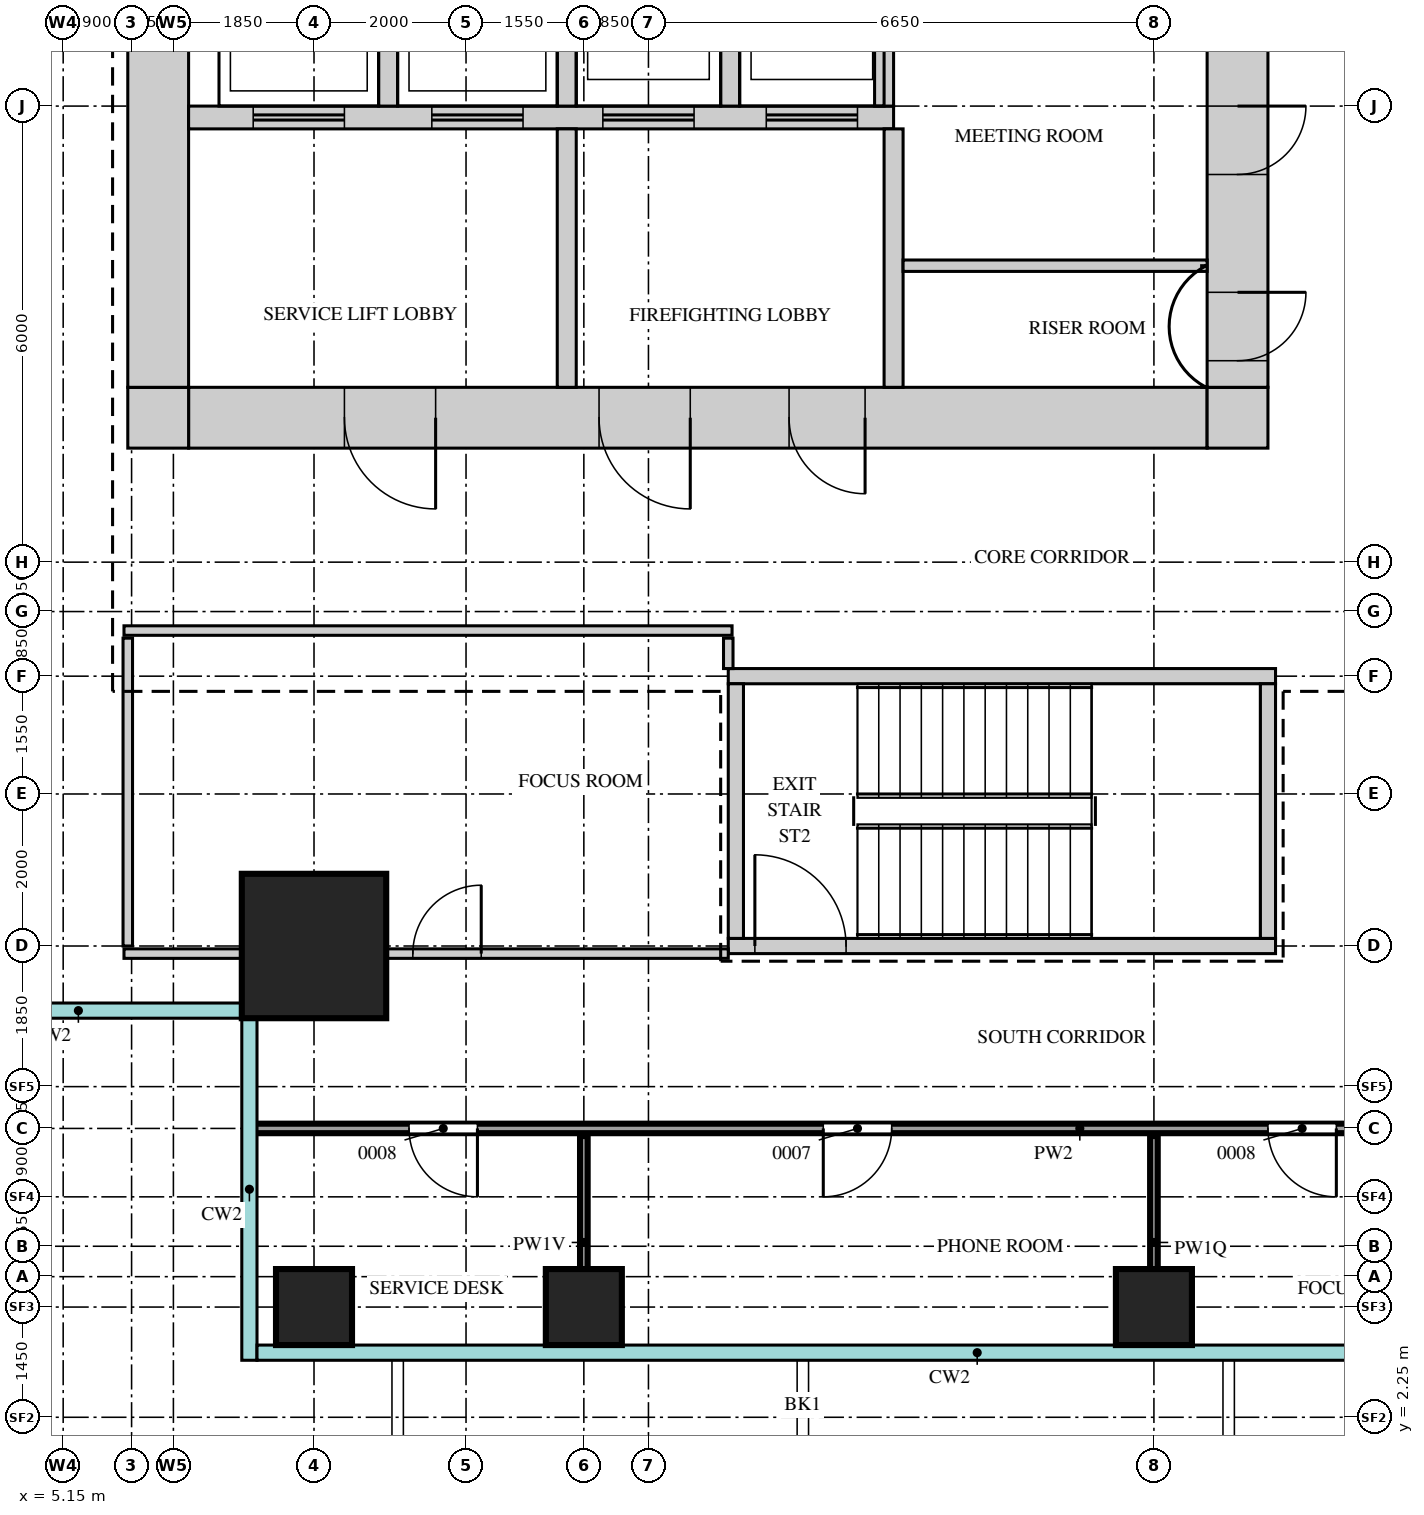
"""IFC4 building model, lengths in metres.
Left out: names, types, materials, properties, quantities, classifications, styles, units other than length and angle.
Written with IfcOpenShell. Run it as: python <this file> out.ifc"""

import sys

from ifc_helpers import new_model, si_unit, direction, frame, frame_2d, origin, origin_2d, place, context, subcontext, project, spatial, rectangle, extrude, source, transform, mapped, element, fill, save


model = new_model("IFC4")
c1 = context("Model", 3, precision=1e-05, world=origin(), true_north=direction((0.0, 1.0)))
c2 = subcontext(c1, "Body", "Model", "MODEL_VIEW")
j1 = project(units=[si_unit("LENGTHUNIT", "METRE"), si_unit("PLANEANGLEUNIT", "RADIAN")], contexts=[c1])
p1 = place(None, origin())
s1 = spatial("IfcSite", under=j1, at=p1, CompositionType="ELEMENT")
p2 = place(p1, origin())
s2 = spatial("IfcBuilding", under=s1, at=p2, CompositionType="ELEMENT")
p3 = place(p2, frame((0.0, 0.0, 172.7)))
s3 = spatial("IfcBuildingStorey", under=s2, at=p3, CompositionType="ELEMENT", Elevation=172.7)
m1 = source(origin(), c2, "Body", "SweptSolid", [
    extrude(rectangle(XDim=13.4, YDim=0.8, at=frame_2d((6.7, 0.0))), origin(), (0.0, 0.0, 1.0), 3.75),
])
p4 = place(p3, frame((6.8, 15.4, 0.0), z_axis=(0.0, 0.0, 1.0), x_axis=(1.0, 0.0, 0.0)))
e1 = element("IfcWall", 1, at=p4, inside=s3, PredefinedType="SHEAR", context=c2, shape_type="MappedRepresentation", body=[
    mapped(m1, transform((0.0, 0.0, 0.0))),
])
m2 = source(origin(), c2, "Body", "SweptSolid", [
    extrude(rectangle(XDim=1.2, YDim=2.1, at=frame_2d((0.6, 1.05))), frame((0.0, 0.41, 0.0), z_axis=(0.0, -1.0, 0.0), x_axis=(1.0, 0.0, 0.0)), (0.0, 0.0, 1.0), 0.82),
])
p5 = place(p4, frame((5.4, 0.0, 0.0)))
e2 = element("IfcOpeningElement", 2, at=p5, cuts=e1, PredefinedType="OPENING", context=c2, shape_type="MappedRepresentation", body=[
    mapped(m2, transform((0.0, 0.0, 0.0))),
])
p6 = place(p4, frame((2.05, 0.0, 0.0)))
e3 = element("IfcOpeningElement", 3, at=p6, cuts=e1, PredefinedType="OPENING", context=c2, shape_type="MappedRepresentation", body=[
    mapped(m2, transform((0.0, 0.0, 0.0))),
])
m3 = source(origin(), c2, "Body", "SweptSolid", [
    extrude(rectangle(XDim=1.0, YDim=2.1, at=frame_2d((0.5, 1.05))), frame((0.0, 0.41, 0.0), z_axis=(0.0, -1.0, 0.0), x_axis=(1.0, 0.0, 0.0)), (0.0, 0.0, 1.0), 0.82),
])
p7 = place(p4, frame((7.9, 0.0, 0.0)))
e4 = element("IfcOpeningElement", 4, at=p7, cuts=e1, PredefinedType="OPENING", context=c2, shape_type="MappedRepresentation", body=[
    mapped(m3, transform((0.0, 0.0, 0.0))),
])
m4 = source(origin(), c2, "Body", "SweptSolid", [
    extrude(rectangle(XDim=0.8, YDim=0.8, at=frame_2d((0.4, 0.0))), origin(), (0.0, 0.0, 1.0), 3.75),
])
for number, where, z_axis, x_axis in (
    (5, (20.2, 15.4, 0.0), (0.0, 0.0, 1.0), (1.0, 0.0, 0.0)),
    (6, (6.0, 15.4, 0.0), (0.0, 0.0, 1.0), (1.0, 0.0, 0.0)),
):
    element("IfcWall", number, at=place(p3, frame(where, z_axis=z_axis, x_axis=x_axis)), inside=s3, PredefinedType="SHEAR", context=c2, shape_type="MappedRepresentation", body=[
        mapped(m4, transform((0.0, 0.0, 0.0))),
    ])
m5 = source(origin(), c2, "Body", "SweptSolid", [
    extrude(rectangle(XDim=22.4, YDim=0.8, at=frame_2d((11.2, 0.0))), origin(), (0.0, 0.0, 1.0), 3.75),
])
p8 = place(p3, frame((20.6, 15.8, 0.0), z_axis=(0.0, 0.0, 1.0), x_axis=(0.0, 1.0, 0.0)))
e7 = element("IfcWall", 7, at=p8, inside=s3, PredefinedType="SHEAR", context=c2, shape_type="MappedRepresentation", body=[
    mapped(m5, transform((0.0, 0.0, 0.0))),
])
m6 = source(origin(), c2, "Body", "SweptSolid", [
    extrude(rectangle(XDim=1.8, YDim=2.1, at=frame_2d((0.9, 1.05))), frame((0.0, 0.41, 0.0), z_axis=(0.0, -1.0, 0.0), x_axis=(1.0, 0.0, 0.0)), (0.0, 0.0, 1.0), 0.82),
])
p9 = place(p8, frame((10.7, 0.0, 0.0)))
e8 = element("IfcOpeningElement", 8, at=p9, cuts=e7, PredefinedType="OPENING", context=c2, shape_type="MappedRepresentation", body=[
    mapped(m6, transform((0.0, 0.0, 0.0))),
])
m7 = source(origin(), c2, "Body", "SweptSolid", [
    extrude(rectangle(XDim=0.9, YDim=2.1, at=frame_2d((0.45, 1.05))), frame((0.0, 0.41, 0.0), z_axis=(0.0, -1.0, 0.0), x_axis=(1.0, 0.0, 0.0)), (0.0, 0.0, 1.0), 0.82),
])
p10 = place(p8, frame((0.35, 0.0, 0.0)))
e9 = element("IfcOpeningElement", 9, at=p10, cuts=e7, PredefinedType="OPENING", context=c2, shape_type="MappedRepresentation", body=[
    mapped(m7, transform((0.0, 0.0, 0.0))),
])
p11 = place(p8, frame((2.8, 0.0, 0.0)))
e10 = element("IfcOpeningElement", 10, at=p11, cuts=e7, PredefinedType="OPENING", context=c2, shape_type="MappedRepresentation", body=[
    mapped(m7, transform((0.0, 0.0, 0.0))),
])
p12 = place(p8, frame((5.55, 0.0, 0.0)))
e11 = element("IfcOpeningElement", 11, at=p12, cuts=e7, PredefinedType="OPENING", context=c2, shape_type="MappedRepresentation", body=[
    mapped(m7, transform((0.0, 0.0, 0.0))),
])
p13 = place(p3, frame((6.4, 15.8, 0.0), z_axis=(0.0, 0.0, 1.0), x_axis=(0.0, 1.0, 0.0)))
e12 = element("IfcWall", 12, at=p13, inside=s3, PredefinedType="SHEAR", context=c2, shape_type="MappedRepresentation", body=[
    mapped(m5, transform((0.0, 0.0, 0.0))),
])
m8 = source(origin(), c2, "Body", "SweptSolid", [
    extrude(rectangle(XDim=7.2, YDim=0.2, at=frame_2d((3.6, 0.0))), origin(), (0.0, 0.0, 1.0), 3.75),
])
p14 = place(p3, frame((13.9, 12.0, 0.0), z_axis=(0.0, 0.0, 1.0), x_axis=(1.0, 0.0, 0.0)))
e13 = element("IfcWall", 13, at=p14, inside=s3, PredefinedType="SHEAR", context=c2, shape_type="MappedRepresentation", body=[
    mapped(m8, transform((0.0, 0.0, 0.0))),
])
p15 = place(p3, frame((13.9, 8.45, 0.0), z_axis=(0.0, 0.0, 1.0), x_axis=(1.0, 0.0, 0.0)))
e14 = element("IfcWall", 14, at=p15, inside=s3, PredefinedType="SHEAR", context=c2, shape_type="MappedRepresentation", body=[
    mapped(m8, transform((0.0, 0.0, 0.0))),
])
m9 = source(origin(), c2, "Body", "SweptSolid", [
    extrude(rectangle(XDim=1.2, YDim=2.1, at=frame_2d((0.6, 1.05))), frame((0.0, 0.11, 0.0), z_axis=(0.0, -1.0, 0.0), x_axis=(1.0, 0.0, 0.0)), (0.0, 0.0, 1.0), 0.22),
])
p16 = place(p15, frame((0.35, 0.0, 0.0)))
e15 = element("IfcOpeningElement", 15, at=p16, cuts=e14, PredefinedType="OPENING", context=c2, shape_type="MappedRepresentation", body=[
    mapped(m9, transform((0.0, 0.0, 0.0))),
])
m10 = source(origin(), c2, "Body", "SweptSolid", [
    extrude(rectangle(XDim=3.35, YDim=0.2, at=frame_2d((1.675, 0.0))), origin(), (0.0, 0.0, 1.0), 3.75),
])
for number, where, z_axis, x_axis in (
    (16, (21.0, 8.55, 0.0), (0.0, 0.0, 1.0), (0.0, 1.0, 0.0)),
    (17, (14.0, 8.55, 0.0), (0.0, 0.0, 1.0), (0.0, 1.0, 0.0)),
):
    element("IfcWall", number, at=place(p3, frame(where, z_axis=z_axis, x_axis=x_axis)), inside=s3, PredefinedType="SHEAR", context=c2, shape_type="MappedRepresentation", body=[
        mapped(m10, transform((0.0, 0.0, 0.0))),
    ])
m11 = source(origin(), c2, "Body", "SweptSolid", [
    extrude(rectangle(XDim=9.275, YDim=0.3, at=frame_2d((4.637, 0.0))), origin(), (0.0, 0.0, 1.0), 3.75),
])
p17 = place(p3, frame((6.8, 19.35, 0.0), z_axis=(0.0, 0.0, 1.0), x_axis=(1.0, 0.0, 0.0)))
e18 = element("IfcWall", 18, at=p17, inside=s3, PredefinedType="STANDARD", context=c2, shape_type="MappedRepresentation", body=[
    mapped(m11, transform((0.0, 0.0, 0.0))),
])
m12 = source(origin(), c2, "Body", "SweptSolid", [
    extrude(rectangle(XDim=1.2, YDim=2.1, at=frame_2d((0.6, 1.05))), frame((0.0, 0.16, 0.0), z_axis=(0.0, -1.0, 0.0), x_axis=(1.0, 0.0, 0.0)), (0.0, 0.0, 1.0), 0.32),
])
p18 = place(p17, frame((0.85, 0.0, 0.0)))
e19 = element("IfcOpeningElement", 19, at=p18, cuts=e18, PredefinedType="OPENING", context=c2, shape_type="MappedRepresentation", body=[
    mapped(m12, transform((0.0, 0.0, 0.0))),
])
p19 = place(p17, frame((3.2, 0.0, 0.0)))
e20 = element("IfcOpeningElement", 20, at=p19, cuts=e18, PredefinedType="OPENING", context=c2, shape_type="MappedRepresentation", body=[
    mapped(m12, transform((0.0, 0.0, 0.0))),
])
p20 = place(p17, frame((5.45, 0.0, 0.0)))
e21 = element("IfcOpeningElement", 21, at=p20, cuts=e18, PredefinedType="OPENING", context=c2, shape_type="MappedRepresentation", body=[
    mapped(m12, transform((0.0, 0.0, 0.0))),
])
p21 = place(p17, frame((7.6, 0.0, 0.0)))
e22 = element("IfcOpeningElement", 22, at=p21, cuts=e18, PredefinedType="OPENING", context=c2, shape_type="MappedRepresentation", body=[
    mapped(m12, transform((0.0, 0.0, 0.0))),
])
m13 = source(origin(), c2, "Body", "SweptSolid", [
    extrude(rectangle(XDim=3.1, YDim=0.25, at=frame_2d((1.55, 0.0))), origin(), (0.0, 0.0, 1.0), 3.75),
])
for number, where, z_axis, x_axis in (
    (23, (9.425, 19.5, 0.0), (0.0, 0.0, 1.0), (0.0, 1.0, 0.0)),
    (24, (11.775, 19.5, 0.0), (0.0, 0.0, 1.0), (0.0, 1.0, 0.0)),
    (25, (13.925, 19.5, 0.0), (0.0, 0.0, 1.0), (0.0, 1.0, 0.0)),
    (26, (15.95, 19.5, 0.0), (0.0, 0.0, 1.0), (0.0, 1.0, 0.0)),
):
    element("IfcWall", number, at=place(p3, frame(where, z_axis=z_axis, x_axis=x_axis)), inside=s3, PredefinedType="STANDARD", context=c2, shape_type="MappedRepresentation", body=[
        mapped(m13, transform((0.0, 0.0, 0.0))),
    ])
m14 = source(origin(), c2, "Body", "SweptSolid", [
    extrude(rectangle(XDim=3.4, YDim=0.25, at=frame_2d((1.7, 0.0))), origin(), (0.0, 0.0, 1.0), 3.75),
])
for number, where, z_axis, x_axis in (
    (27, (16.075, 15.8, 0.0), (0.0, 0.0, 1.0), (0.0, 1.0, 0.0)),
    (28, (11.775, 15.8, 0.0), (0.0, 0.0, 1.0), (0.0, 1.0, 0.0)),
):
    element("IfcWall", number, at=place(p3, frame(where, z_axis=z_axis, x_axis=x_axis)), inside=s3, PredefinedType="STANDARD", context=c2, shape_type="MappedRepresentation", body=[
        mapped(m14, transform((0.0, 0.0, 0.0))),
    ])
m15 = source(origin(), c2, "Body", "SweptSolid", [
    extrude(rectangle(XDim=1.9, YDim=1.9, at=origin_2d()), origin(), (0.0, 0.0, 1.0), 4.0),
])
p22 = place(p3, frame((8.45, 8.45, 0.0), z_axis=(0.0, 0.0, 1.0), x_axis=(1.0, 0.0, 0.0)))
e29 = element("IfcColumn", 29, at=p22, inside=s3, PredefinedType="COLUMN", context=c2, shape_type="MappedRepresentation", body=[
    mapped(m15, transform((0.0, 0.0, 0.0))),
])
m16 = source(origin(), c2, "Body", "SweptSolid", [
    extrude(rectangle(XDim=1.0, YDim=1.0, at=origin_2d()), origin(), (0.0, 0.0, 1.0), 3.75),
])
for number, where, z_axis, x_axis in (
    (30, (8.45, 3.7, 0.0), (0.0, 0.0, 1.0), (1.0, 0.0, 0.0)),
    (31, (12.0, 3.7, 0.0), (0.0, 0.0, 1.0), (1.0, 0.0, 0.0)),
    (32, (19.5, 3.7, 0.0), (0.0, 0.0, 1.0), (1.0, 0.0, 0.0)),
):
    element("IfcColumn", number, at=place(p3, frame(where, z_axis=z_axis, x_axis=x_axis)), inside=s3, PredefinedType="COLUMN", context=c2, shape_type="MappedRepresentation", body=[
        mapped(m16, transform((0.0, 0.0, 0.0))),
    ])
m17 = source(origin(), c2, "Body", "SweptSolid", [
    extrude(rectangle(XDim=2.8, YDim=0.1, at=frame_2d((1.4, 0.0))), origin(), (0.0, 0.0, 1.0), 3.25),
])
p23 = place(p3, frame((12.0, 3.15, 0.0), z_axis=(0.0, 0.0, 1.0), x_axis=(0.0, 1.0, 0.0)))
e33 = element("IfcWall", 33, at=p23, inside=s3, PredefinedType="PARTITIONING", context=c2, shape_type="MappedRepresentation", body=[
    mapped(m17, transform((0.0, 0.0, 0.0))),
])
m18 = source(origin(), c2, "Body", "SweptSolid", [
    extrude(rectangle(XDim=2.8, YDim=0.1, at=frame_2d((1.4, 0.0))), origin(), (0.0, 0.0, 1.0), 3.42),
])
p24 = place(p3, frame((19.5, 3.15, 0.0), z_axis=(0.0, 0.0, 1.0), x_axis=(0.0, 1.0, 0.0)))
e34 = element("IfcWall", 34, at=p24, inside=s3, PredefinedType="PARTITIONING", context=c2, shape_type="MappedRepresentation", body=[
    mapped(m18, transform((0.0, 0.0, 0.0))),
])
m19 = source(origin(), c2, "Body", "SweptSolid", [
    extrude(rectangle(XDim=15.8, YDim=0.125, at=frame_2d((7.9, 0.0))), origin(), (0.0, 0.0, 1.0), 3.8),
])
p25 = place(p3, frame((7.65, 6.05, 0.0), z_axis=(0.0, 0.0, 1.0), x_axis=(1.0, 0.0, 0.0)))
e35 = element("IfcWall", 35, at=p25, inside=s3, PredefinedType="PARTITIONING", context=c2, shape_type="MappedRepresentation", body=[
    mapped(m19, transform((0.0, 0.0, 0.0))),
])
m20 = source(origin(), c2, "Body", "SweptSolid", [
    extrude(rectangle(XDim=0.9, YDim=2.1, at=frame_2d((0.45, 1.05))), frame((0.0, 0.073, 0.0), z_axis=(0.0, -1.0, 0.0), x_axis=(1.0, 0.0, 0.0)), (0.0, 0.0, 1.0), 0.145),
])
p26 = place(p25, frame((2.05, 0.0, 0.0)))
e36 = element("IfcOpeningElement", 36, at=p26, cuts=e35, PredefinedType="OPENING", context=c2, shape_type="MappedRepresentation", body=[
    mapped(m20, transform((0.0, 0.0, 0.0))),
])
p27 = place(p25, frame((7.5, 0.0, 0.0)))
e37 = element("IfcOpeningElement", 37, at=p27, cuts=e35, PredefinedType="OPENING", context=c2, shape_type="MappedRepresentation", body=[
    mapped(m20, transform((0.0, 0.0, 0.0))),
])
p28 = place(p25, frame((13.35, 0.0, 0.0)))
e38 = element("IfcOpeningElement", 38, at=p28, cuts=e35, PredefinedType="OPENING", context=c2, shape_type="MappedRepresentation", body=[
    mapped(m20, transform((0.0, 0.0, 0.0))),
])
m21 = source(origin(), c2, "Body", "SweptSolid", [
    extrude(rectangle(XDim=7.95, YDim=0.125, at=frame_2d((3.975, 0.0))), origin(), (0.0, 0.0, 1.0), 3.25),
])
p29 = place(p3, frame((5.95, 8.35, 0.0), z_axis=(0.0, 0.0, 1.0), x_axis=(1.0, 0.0, 0.0)))
e39 = element("IfcWall", 39, at=p29, inside=s3, PredefinedType="PARTITIONING", context=c2, shape_type="MappedRepresentation", body=[
    mapped(m21, transform((0.0, 0.0, 0.0))),
])
p30 = place(p29, frame((3.8, 0.0, 0.0)))
e40 = element("IfcOpeningElement", 40, at=p30, cuts=e39, PredefinedType="OPENING", context=c2, shape_type="MappedRepresentation", body=[
    mapped(m20, transform((0.0, 0.0, 0.0))),
])
m22 = source(origin(), c2, "Body", "SweptSolid", [
    extrude(rectangle(XDim=4.05, YDim=0.125, at=frame_2d((2.025, 0.0))), origin(), (0.0, 0.0, 1.0), 3.8),
])
p31 = place(p3, frame((6.0, 8.45, 0.0), z_axis=(0.0, 0.0, 1.0), x_axis=(0.0, 1.0, 0.0)))
e41 = element("IfcWall", 41, at=p31, inside=s3, PredefinedType="PARTITIONING", context=c2, shape_type="MappedRepresentation", body=[
    mapped(m22, transform((0.0, 0.0, 0.0))),
])
m23 = source(origin(), c2, "Body", "SweptSolid", [
    extrude(rectangle(XDim=0.4, YDim=0.125, at=frame_2d((0.2, 0.0))), origin(), (0.0, 0.0, 1.0), 3.8),
])
p32 = place(p3, frame((13.9, 12.1, 0.0), z_axis=(0.0, 0.0, 1.0), x_axis=(0.0, 1.0, 0.0)))
e42 = element("IfcWall", 42, at=p32, inside=s3, PredefinedType="PARTITIONING", context=c2, shape_type="MappedRepresentation", body=[
    mapped(m23, transform((0.0, 0.0, 0.0))),
])
m24 = source(origin(), c2, "Body", "SweptSolid", [
    extrude(rectangle(XDim=8.0, YDim=0.125, at=frame_2d((4.0, 0.0))), origin(), (0.0, 0.0, 1.0), 3.8),
])
p33 = place(p3, frame((5.95, 12.6, 0.0), z_axis=(0.0, 0.0, 1.0), x_axis=(1.0, 0.0, 0.0)))
e43 = element("IfcWall", 43, at=p33, inside=s3, PredefinedType="PARTITIONING", context=c2, shape_type="MappedRepresentation", body=[
    mapped(m24, transform((0.0, 0.0, 0.0))),
])
m25 = source(origin(), c2, "Body", "SweptSolid", [
    extrude(rectangle(XDim=4.0, YDim=0.15, at=frame_2d((2.0, 0.0))), origin(), (0.0, 0.0, 1.0), 3.8),
])
p34 = place(p3, frame((16.2, 17.4, 0.0), z_axis=(0.0, 0.0, 1.0), x_axis=(1.0, 0.0, 0.0)))
e44 = element("IfcWall", 44, at=p34, inside=s3, PredefinedType="PARTITIONING", context=c2, shape_type="MappedRepresentation", body=[
    mapped(m25, transform((0.0, 0.0, 0.0))),
])
m26 = source(origin(), c2, "Body", "SweptSolid", [
    extrude(rectangle(XDim=0.9, YDim=2.1, at=frame_2d((0.45, 1.05))), frame((0.0, 0.35, 0.0), z_axis=(0.0, -1.0, 0.0), x_axis=(1.0, 0.0, 0.0)), (0.0, 0.0, 1.0), 0.7),
])
p35 = place(p10, origin())
e45 = element("IfcDoor", 45, at=p35, inside=s3, OperationType="SINGLE_SWING_RIGHT", PredefinedType="DOOR", context=c2, shape_type="MappedRepresentation", body=[
    mapped(m26, transform((0.0, 0.0, 0.0))),
])
fill(e9, e45)
p36 = place(p11, origin())
e46 = element("IfcDoor", 46, at=p36, inside=s3, OperationType="SINGLE_SWING_RIGHT", PredefinedType="DOOR", context=c2, shape_type="MappedRepresentation", body=[
    mapped(m26, transform((0.0, 0.0, 0.0))),
])
fill(e10, e46)
m27 = source(origin(), c2, "Body", "SweptSolid", [
    extrude(rectangle(XDim=1.2, YDim=2.1, at=frame_2d((0.6, 1.05))), frame((0.0, 0.35, 0.0), z_axis=(0.0, -1.0, 0.0), x_axis=(1.0, 0.0, 0.0)), (0.0, 0.0, 1.0), 0.7),
])
p37 = place(p5, origin())
e47 = element("IfcDoor", 47, at=p37, inside=s3, OperationType="SINGLE_SWING_RIGHT", PredefinedType="DOOR", context=c2, shape_type="MappedRepresentation", body=[
    mapped(m27, transform((0.0, 0.0, 0.0))),
])
fill(e2, e47)
p38 = place(p6, origin())
e48 = element("IfcDoor", 48, at=p38, inside=s3, OperationType="SINGLE_SWING_RIGHT", PredefinedType="DOOR", context=c2, shape_type="MappedRepresentation", body=[
    mapped(m27, transform((0.0, 0.0, 0.0))),
])
fill(e3, e48)
m28 = source(origin(), c2, "Body", "SweptSolid", [
    extrude(rectangle(XDim=1.0, YDim=2.1, at=frame_2d((0.5, 1.05))), frame((0.0, 0.35, 0.0), z_axis=(0.0, -1.0, 0.0), x_axis=(1.0, 0.0, 0.0)), (0.0, 0.0, 1.0), 0.7),
])
p39 = place(p7, origin())
e49 = element("IfcDoor", 49, at=p39, inside=s3, OperationType="SINGLE_SWING_RIGHT", PredefinedType="DOOR", context=c2, shape_type="MappedRepresentation", body=[
    mapped(m28, transform((0.0, 0.0, 0.0))),
])
fill(e4, e49)
m29 = source(origin(), c2, "Body", "SweptSolid", [
    extrude(rectangle(XDim=0.9, YDim=2.1, at=frame_2d((0.45, 1.05))), frame((0.0, 0.025, 0.0), z_axis=(0.0, -1.0, 0.0), x_axis=(1.0, 0.0, 0.0)), (0.0, 0.0, 1.0), 0.05),
])
p40 = place(p30, origin())
e50 = element("IfcDoor", 50, at=p40, inside=s3, OperationType="SINGLE_SWING_LEFT", PredefinedType="DOOR", context=c2, shape_type="MappedRepresentation", body=[
    mapped(m29, transform((0.0, 0.0, 0.0))),
])
fill(e40, e50)
p41 = place(p26, origin())
e51 = element("IfcDoor", 51, at=p41, inside=s3, OperationType="SINGLE_SWING_RIGHT", PredefinedType="DOOR", context=c2, shape_type="MappedRepresentation", body=[
    mapped(m29, transform((0.0, 0.0, 0.0))),
])
fill(e36, e51)
p42 = place(p27, origin())
e52 = element("IfcDoor", 52, at=p42, inside=s3, OperationType="SINGLE_SWING_LEFT", PredefinedType="DOOR", context=c2, shape_type="MappedRepresentation", body=[
    mapped(m29, transform((0.0, 0.0, 0.0))),
])
fill(e37, e52)
p43 = place(p28, origin())
e53 = element("IfcDoor", 53, at=p43, inside=s3, OperationType="SINGLE_SWING_RIGHT", PredefinedType="DOOR", context=c2, shape_type="MappedRepresentation", body=[
    mapped(m29, transform((0.0, 0.0, 0.0))),
])
fill(e38, e53)
m30 = source(origin(), c2, "Body", "SweptSolid", [
    extrude(rectangle(XDim=1.2, YDim=2.1, at=frame_2d((0.6, 1.05))), frame((0.0, 0.025, 0.0), z_axis=(0.0, -1.0, 0.0), x_axis=(1.0, 0.0, 0.0)), (0.0, 0.0, 1.0), 0.05),
])
p44 = place(p16, origin())
e54 = element("IfcDoor", 54, at=p44, inside=s3, OperationType="SINGLE_SWING_RIGHT", PredefinedType="DOOR", context=c2, shape_type="MappedRepresentation", body=[
    mapped(m30, transform((0.0, 0.0, 0.0))),
])
fill(e15, e54)
p45 = place(p18, origin())
e55 = element("IfcDoor", 55, at=p45, inside=s3, OperationType="DOUBLE_DOOR_SLIDING", PredefinedType="DOOR", context=c2, shape_type="MappedRepresentation", body=[
    mapped(m30, transform((0.0, 0.0, 0.0))),
])
fill(e19, e55)
p46 = place(p19, origin())
e56 = element("IfcDoor", 56, at=p46, inside=s3, OperationType="DOUBLE_DOOR_SLIDING", PredefinedType="DOOR", context=c2, shape_type="MappedRepresentation", body=[
    mapped(m30, transform((0.0, 0.0, 0.0))),
])
fill(e20, e56)
p47 = place(p20, origin())
e57 = element("IfcDoor", 57, at=p47, inside=s3, OperationType="DOUBLE_DOOR_SLIDING", PredefinedType="DOOR", context=c2, shape_type="MappedRepresentation", body=[
    mapped(m30, transform((0.0, 0.0, 0.0))),
])
fill(e21, e57)
p48 = place(p21, origin())
e58 = element("IfcDoor", 58, at=p48, inside=s3, OperationType="DOUBLE_DOOR_SLIDING", PredefinedType="DOOR", context=c2, shape_type="MappedRepresentation", body=[
    mapped(m30, transform((0.0, 0.0, 0.0))),
])
fill(e22, e58)
save(model, sys.argv[1])
